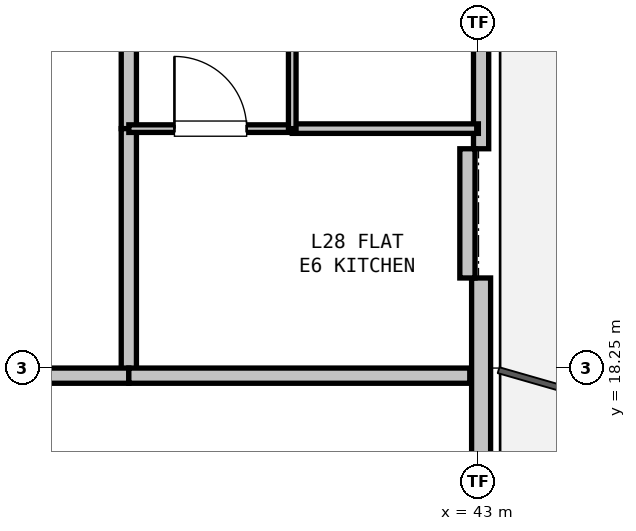
"""IFC4 building model, lengths in metres.
Left out: names, types, materials, properties, quantities, classifications, styles, units other than length and angle.
Written with IfcOpenShell. Run it as: python <this file> out.ifc"""

import sys

from ifc_helpers import new_model, si_unit, direction, frame, frame_2d, origin, place, context, subcontext, project, spatial, rectangle, extrude, element, fill, save


model = new_model("IFC4")
c1 = context("Model", 3, precision=1e-05, world=origin(), true_north=direction((0.0, 1.0)))
c2 = subcontext(c1, "Body", "Model", "MODEL_VIEW")
j1 = project(units=[si_unit("LENGTHUNIT", "METRE"), si_unit("PLANEANGLEUNIT", "RADIAN")], contexts=[c1])
p1 = place(None, origin())
s1 = spatial("IfcSite", under=j1, at=p1, CompositionType="ELEMENT")
p2 = place(p1, origin())
s2 = spatial("IfcBuilding", under=s1, at=p2, CompositionType="ELEMENT")
p3 = place(p2, frame((0.0, 0.0, 103.2)))
s3 = spatial("IfcBuildingStorey", under=s2, at=p3, CompositionType="ELEMENT", Elevation=103.2)
p4 = place(p3, frame((43.035, 32.365, 0.0), z_axis=(0.0, 0.0, 1.0), x_axis=(0.0, -1.0, 0.0)))
e1 = element("IfcWall", 1, at=p4, inside=s3, PredefinedType="PARAPET", context=c2, shape_type="SweptSolid", body=[
    extrude(rectangle(XDim=11.229, YDim=0.2, at=frame_2d((5.615, 0.0))), origin(), (0.0, 0.0, 1.0), 0.2),
])
p5 = place(p3, frame((43.035, 19.435, 0.0), z_axis=(0.0, 0.0, 1.0), x_axis=(0.0, -1.0, 0.0)))
e2 = element("IfcWall", 2, at=p5, inside=s3, PredefinedType="SOLIDWALL", context=c2, shape_type="SweptSolid", body=[
    extrude(rectangle(XDim=11.93, YDim=0.25, at=frame_2d((5.965, 0.0))), origin(), (0.0, 0.0, 1.0), 2.67),
])
p6 = place(p5, frame((7.941, 0.0, 0.9)))
e3 = element("IfcOpeningElement", 3, at=p6, cuts=e2, PredefinedType="OPENING", context=c2, shape_type="SweptSolid", body=[
    extrude(rectangle(XDim=0.9, YDim=1.4, at=frame_2d((0.45, 0.7))), frame((0.0, 0.135, 0.0), z_axis=(0.0, -1.0, 0.0), x_axis=(1.0, 0.0, 0.0)), (0.0, 0.0, 1.0), 0.27),
])
p7 = place(p3, frame((42.854, 21.135, 0.0), z_axis=(0.0, 0.0, 1.0), x_axis=(0.0, -1.0, 0.0)))
e4 = element("IfcWall", 4, at=p7, inside=s3, PredefinedType="PARAPET", context=c2, shape_type="SweptSolid", body=[
    extrude(rectangle(XDim=1.7, YDim=0.2, at=frame_2d((0.85, 0.0))), origin(), (0.0, 0.0, 1.0), 2.67),
])
p8 = place(p3, frame((38.4, 24.8, 0.0), z_axis=(0.0, 0.0, 1.0), x_axis=(0.0, -1.0, 0.0)))
e5 = element("IfcWall", 5, at=p8, inside=s3, PredefinedType="PARTITIONING", context=c2, shape_type="SweptSolid", body=[
    extrude(rectangle(XDim=3.4, YDim=0.2, at=frame_2d((1.7, 0.0))), origin(), (0.0, 0.0, 1.0), 3.05),
])
p9 = place(p3, frame((38.4, 21.4, 0.0), z_axis=(0.0, 0.0, 1.0), x_axis=(0.0, -1.0, 0.0)))
e6 = element("IfcWall", 6, at=p9, inside=s3, PredefinedType="PARTITIONING", context=c2, shape_type="SweptSolid", body=[
    extrude(rectangle(XDim=3.25, YDim=0.2, at=frame_2d((1.625, 0.0))), origin(), (0.0, 0.0, 1.0), 3.05),
])
p10 = place(p3, frame((38.4, 18.15, 0.0), z_axis=(0.0, 0.0, 1.0), x_axis=(-1.0, 0.0, 0.0)))
e7 = element("IfcWall", 7, at=p10, inside=s3, PredefinedType="PARTITIONING", context=c2, shape_type="SweptSolid", body=[
    extrude(rectangle(XDim=2.6, YDim=0.2, at=frame_2d((1.3, 0.0))), origin(), (0.0, 0.0, 1.0), 2.423),
])
p11 = place(p3, frame((38.4, 18.15, 0.0), z_axis=(0.0, 0.0, 1.0), x_axis=(1.0, 0.0, 0.0)))
e8 = element("IfcWall", 8, at=p11, inside=s3, PredefinedType="PARTITIONING", context=c2, shape_type="SweptSolid", body=[
    extrude(rectangle(XDim=4.486, YDim=0.2, at=frame_2d((2.243, 0.0))), origin(), (0.0, 0.0, 1.0), 2.365),
])
p12 = place(p3, frame((38.4, 21.4, 0.0), z_axis=(0.0, 0.0, 1.0), x_axis=(1.0, 0.0, 0.0)))
e9 = element("IfcWall", 9, at=p12, inside=s3, PredefinedType="PARTITIONING", context=c2, shape_type="SweptSolid", body=[
    extrude(rectangle(XDim=2.15, YDim=0.1, at=frame_2d((1.075, 0.0))), origin(), (0.0, 0.0, 1.0), 3.05),
])
p13 = place(p12, frame((0.6, 0.0, 0.0)))
e10 = element("IfcOpeningElement", 10, at=p13, cuts=e9, PredefinedType="OPENING", context=c2, shape_type="SweptSolid", body=[
    extrude(rectangle(XDim=0.95, YDim=2.1, at=frame_2d((0.475, 1.05))), frame((0.0, 0.06, 0.0), z_axis=(0.0, -1.0, 0.0), x_axis=(1.0, 0.0, 0.0)), (0.0, 0.0, 1.0), 0.12),
])
p14 = place(p3, frame((40.55, 21.4, 0.0), z_axis=(0.0, 0.0, 1.0), x_axis=(1.0, 0.0, 0.0)))
e11 = element("IfcWall", 11, at=p14, inside=s3, PredefinedType="PARTITIONING", context=c2, shape_type="SweptSolid", body=[
    extrude(rectangle(XDim=2.448, YDim=0.125, at=frame_2d((1.224, 0.0))), origin(), (0.0, 0.0, 1.0), 2.365),
])
p15 = place(p3, frame((40.55, 21.4, 0.0), z_axis=(0.0, 0.0, 1.0), x_axis=(0.0, 1.0, 0.0)))
e12 = element("IfcWall", 12, at=p15, inside=s3, PredefinedType="PARTITIONING", context=c2, shape_type="SweptSolid", body=[
    extrude(rectangle(XDim=3.4, YDim=0.1, at=frame_2d((1.7, 0.0))), origin(), (0.0, 0.0, 1.0), 3.05),
])
p16 = place(p15, frame((1.225, 0.0, 0.0)))
e13 = element("IfcOpeningElement", 13, at=p16, cuts=e12, PredefinedType="OPENING", context=c2, shape_type="SweptSolid", body=[
    extrude(rectangle(XDim=0.95, YDim=2.1, at=frame_2d((0.475, 1.05))), frame((0.0, 0.06, 0.0), z_axis=(0.0, -1.0, 0.0), x_axis=(1.0, 0.0, 0.0)), (0.0, 0.0, 1.0), 0.12),
])
p17 = place(p13, origin())
e14 = element("IfcDoor", 14, at=p17, inside=s3, OperationType="SINGLE_SWING_LEFT", PredefinedType="DOOR", context=c2, shape_type="SweptSolid", body=[
    extrude(rectangle(XDim=0.95, YDim=2.1, at=frame_2d((0.475, 1.05))), frame((0.0, 0.025, 0.0), z_axis=(0.0, -1.0, 0.0), x_axis=(1.0, 0.0, 0.0)), (0.0, 0.0, 1.0), 0.05),
])
fill(e10, e14)
save(model, sys.argv[1])
